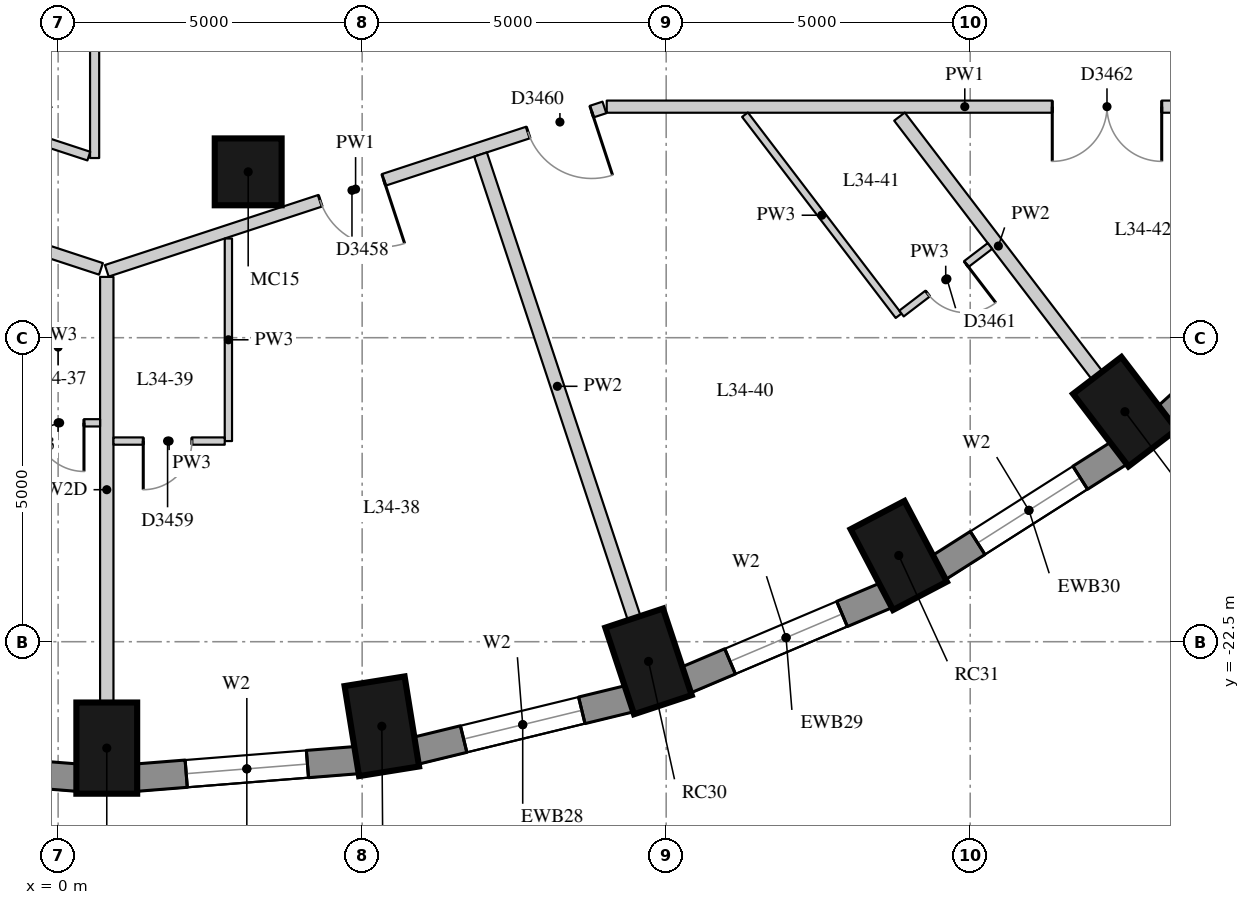
"""IFC4 building model, lengths in metres.
Left out: names, types, materials, properties, quantities, classifications, styles, units other than length and angle.
Written with IfcOpenShell. Run it as: python <this file> out.ifc"""

import sys

from ifc_helpers import new_model, si_unit, direction, frame, frame_2d, origin, origin_2d, place, context, subcontext, project, spatial, rectangle, extrude, element, fill, save


model = new_model("IFC4")
c1 = context("Model", 3, precision=1e-05, world=origin(), true_north=direction((0.0, 1.0)))
c2 = subcontext(c1, "Body", "Model", "MODEL_VIEW")
j1 = project(units=[si_unit("LENGTHUNIT", "METRE"), si_unit("PLANEANGLEUNIT", "RADIAN")], contexts=[c1])
p1 = place(None, origin())
s1 = spatial("IfcSite", under=j1, at=p1, CompositionType="ELEMENT")
p2 = place(p1, origin())
s2 = spatial("IfcBuilding", under=s1, at=p2, CompositionType="ELEMENT")
p3 = place(p2, frame((0.0, 0.0, 121.9)))
s3 = spatial("IfcBuildingStorey", under=s2, at=p3, CompositionType="ELEMENT", Elevation=121.9)
for number, where, z_axis, x_axis in (
    (1, (0.8, -24.25, 0.0), (0.0, 0.0, 1.0), (0.0, -1.0, 0.0)),
    (2, (5.323, -23.891, 0.0), (0.0, 0.0, 1.0), (0.159, -0.987, 0.0)),
    (3, (9.71, -22.824, 0.0), (0.0, 0.0, 1.0), (0.315, -0.949, 0.0)),
    (4, (13.825, -21.082, 0.0), (0.0, 0.0, 1.0), (0.465, -0.885, 0.0)),
    (5, (17.545, -18.717, 0.0), (0.0, 0.0, 1.0), (0.607, -0.795, 0.0)),
):
    element("IfcColumn", number, at=place(p3, frame(where, z_axis=z_axis, x_axis=x_axis)), inside=s3, PredefinedType="COLUMN", context=c2, shape_type="SweptSolid", body=[
        extrude(rectangle(XDim=1.5, YDim=1.0, at=origin_2d()), origin(), (0.0, 0.0, 1.0), 3.3),
    ])
p4 = place(p3, frame((3.126, -14.772, 0.0), z_axis=(0.0, 0.0, 1.0), x_axis=(1.0, 0.0, 0.0)))
e6 = element("IfcColumn", 6, at=p4, inside=s3, PredefinedType="COLUMN", context=c2, shape_type="SweptSolid", body=[
    extrude(rectangle(XDim=1.1, YDim=1.1, at=origin_2d()), origin(), (0.0, 0.0, 1.0), 3.3),
])
p5 = place(p3, frame((-3.327, -24.447, 0.0), z_axis=(0.0, 0.0, 1.0), x_axis=(0.996862216754, -0.079156306178, 0.0)))
e7 = element("IfcWall", 7, at=p5, inside=s3, PredefinedType="SOLIDWALL", context=c2, shape_type="SweptSolid", body=[
    extrude(rectangle(XDim=3.658, YDim=0.45, at=frame_2d((1.829, 0.0))), origin(), (0.0, 0.0, 1.0), 3.02),
])
p6 = place(p5, frame((0.829, 0.0, 0.4)))
e8 = element("IfcOpeningElement", 8, at=p6, cuts=e7, PredefinedType="OPENING", context=c2, shape_type="SweptSolid", body=[
    extrude(rectangle(XDim=2.0, YDim=1.75, at=frame_2d((1.0, 0.875))), frame((0.0, 0.235, 0.0), z_axis=(0.0, -1.0, 0.0), x_axis=(1.0, 0.0, 0.0)), (0.0, 0.0, 1.0), 0.47),
])
p7 = place(p3, frame((1.28, -24.736, 0.0), z_axis=(0.0, 0.0, 1.0), x_axis=(0.996862216754, 0.079156306178, 0.0)))
e9 = element("IfcWall", 9, at=p7, inside=s3, PredefinedType="SOLIDWALL", context=c2, shape_type="SweptSolid", body=[
    extrude(rectangle(XDim=3.658, YDim=0.45, at=frame_2d((1.829, 0.0))), origin(), (0.0, 0.0, 1.0), 3.02),
])
p8 = place(p7, frame((0.829, 0.0, 0.4)))
e10 = element("IfcOpeningElement", 10, at=p8, cuts=e9, PredefinedType="OPENING", context=c2, shape_type="SweptSolid", body=[
    extrude(rectangle(XDim=2.0, YDim=1.75, at=frame_2d((1.0, 0.875))), frame((0.0, 0.235, 0.0), z_axis=(0.0, -1.0, 0.0), x_axis=(1.0, 0.0, 0.0)), (0.0, 0.0, 1.0), 0.47),
])
p9 = place(p3, frame((5.875, -24.294, 0.0), z_axis=(0.0, 0.0, 1.0), x_axis=(0.971667603162, 0.236351579148, 0.0)))
e11 = element("IfcWall", 11, at=p9, inside=s3, PredefinedType="SOLIDWALL", context=c2, shape_type="SweptSolid", body=[
    extrude(rectangle(XDim=3.635, YDim=0.45, at=frame_2d((1.817, 0.0))), origin(), (0.0, 0.0, 1.0), 3.02),
])
p10 = place(p9, frame((0.817, 0.0, 0.4)))
e12 = element("IfcOpeningElement", 12, at=p10, cuts=e11, PredefinedType="OPENING", context=c2, shape_type="SweptSolid", body=[
    extrude(rectangle(XDim=2.0, YDim=1.75, at=frame_2d((1.0, 0.875))), frame((0.0, 0.235, 0.0), z_axis=(0.0, -1.0, 0.0), x_axis=(1.0, 0.0, 0.0)), (0.0, 0.0, 1.0), 0.47),
])
p11 = place(p3, frame((10.318, -23.134, 0.0), z_axis=(0.0, 0.0, 1.0), x_axis=(0.920869643542, 0.389870619055, 0.0)))
e13 = element("IfcWall", 13, at=p11, inside=s3, PredefinedType="SOLIDWALL", context=c2, shape_type="SweptSolid", body=[
    extrude(rectangle(XDim=3.591, YDim=0.45, at=frame_2d((1.796, 0.0))), origin(), (0.0, 0.0, 1.0), 3.02),
])
p12 = place(p11, frame((0.796, 0.0, 0.4)))
e14 = element("IfcOpeningElement", 14, at=p12, cuts=e13, PredefinedType="OPENING", context=c2, shape_type="SweptSolid", body=[
    extrude(rectangle(XDim=2.0, YDim=1.75, at=frame_2d((1.0, 0.875))), frame((0.0, 0.235, 0.0), z_axis=(0.0, -1.0, 0.0), x_axis=(1.0, 0.0, 0.0)), (0.0, 0.0, 1.0), 0.47),
])
p13 = place(p3, frame((14.475, -21.287, 0.0), z_axis=(0.0, 0.0, 1.0), x_axis=(0.843911841423, 0.536481876587, 0.0)))
e15 = element("IfcWall", 15, at=p13, inside=s3, PredefinedType="SOLIDWALL", context=c2, shape_type="SweptSolid", body=[
    extrude(rectangle(XDim=3.532, YDim=0.45, at=frame_2d((1.766, 0.0))), origin(), (0.0, 0.0, 1.0), 3.02),
])
p14 = place(p13, frame((0.766, 0.0, 0.4)))
e16 = element("IfcOpeningElement", 16, at=p14, cuts=e15, PredefinedType="OPENING", context=c2, shape_type="SweptSolid", body=[
    extrude(rectangle(XDim=2.0, YDim=1.75, at=frame_2d((1.0, 0.875))), frame((0.0, 0.235, 0.0), z_axis=(0.0, -1.0, 0.0), x_axis=(1.0, 0.0, 0.0)), (0.0, 0.0, 1.0), 0.47),
])
p15 = place(p3, frame((18.219, -18.81, 0.0), z_axis=(0.0, 0.0, 1.0), x_axis=(0.740364106106, 0.672206062446, 0.0)))
e17 = element("IfcWall", 17, at=p15, inside=s3, PredefinedType="SOLIDWALL", context=c2, shape_type="SweptSolid", body=[
    extrude(rectangle(XDim=3.464, YDim=0.45, at=frame_2d((1.732, 0.0))), origin(), (0.0, 0.0, 1.0), 3.02),
])
p16 = place(p3, frame((20.8, -13.7, 0.0), z_axis=(0.0, 0.0, 1.0), x_axis=(-1.0, 0.0, 0.0)))
e18 = element("IfcWall", 18, at=p16, inside=s3, PredefinedType="PARTITIONING", context=c2, shape_type="SweptSolid", body=[
    extrude(rectangle(XDim=11.778, YDim=0.2, at=frame_2d((5.889, 0.0))), origin(), (0.0, 0.0, 1.0), 3.02),
])
p17 = place(p16, frame((2.65, 0.0, 0.0)))
e19 = element("IfcOpeningElement", 19, at=p17, cuts=e18, PredefinedType="OPENING", context=c2, shape_type="SweptSolid", body=[
    extrude(rectangle(XDim=1.8, YDim=2.1, at=frame_2d((0.9, 1.05))), frame((0.0, 0.11, 0.0), z_axis=(0.0, -1.0, 0.0), x_axis=(1.0, 0.0, 0.0)), (0.0, 0.0, 1.0), 0.22),
])
p18 = place(p3, frame((8.984, -13.713, 0.0), z_axis=(0.0, 0.0, 1.0), x_axis=(-0.950093687873, -0.311964716378, 0.0)))
e20 = element("IfcWall", 20, at=p18, inside=s3, PredefinedType="PARTITIONING", context=c2, shape_type="SweptSolid", body=[
    extrude(rectangle(XDim=8.614, YDim=0.2, at=frame_2d((4.307, 0.0))), origin(), (0.0, 0.0, 1.0), 3.02),
])
p19 = place(p18, frame((3.82, 0.0, 0.0)))
e21 = element("IfcOpeningElement", 21, at=p19, cuts=e20, PredefinedType="OPENING", context=c2, shape_type="SweptSolid", body=[
    extrude(rectangle(XDim=1.1, YDim=2.1, at=frame_2d((0.55, 1.05))), frame((0.0, 0.11, 0.0), z_axis=(0.0, -1.0, 0.0), x_axis=(1.0, 0.0, 0.0)), (0.0, 0.0, 1.0), 0.22),
])
p20 = place(p18, frame((0.22, 0.0, 0.0)))
e22 = element("IfcOpeningElement", 22, at=p20, cuts=e20, PredefinedType="OPENING", context=c2, shape_type="SweptSolid", body=[
    extrude(rectangle(XDim=1.1, YDim=2.1, at=frame_2d((0.55, 1.05))), frame((0.0, 0.11, 0.0), z_axis=(0.0, -1.0, 0.0), x_axis=(1.0, 0.0, 0.0)), (0.0, 0.0, 1.0), 0.22),
])
p21 = place(p3, frame((0.705, -16.368, 0.0), z_axis=(0.0, 0.0, 1.0), x_axis=(-0.95010544032, 0.311928921832, 0.0)))
e23 = element("IfcWall", 23, at=p21, inside=s3, PredefinedType="PARTITIONING", context=c2, shape_type="SweptSolid", body=[
    extrude(rectangle(XDim=8.951, YDim=0.2, at=frame_2d((4.476, 0.0))), origin(), (0.0, 0.0, 1.0), 2.57),
])
p22 = place(p21, frame((6.993, 0.0, 0.0)))
e24 = element("IfcOpeningElement", 24, at=p22, cuts=e23, PredefinedType="OPENING", context=c2, shape_type="SweptSolid", body=[
    extrude(rectangle(XDim=1.1, YDim=2.1, at=frame_2d((0.55, 1.05))), frame((0.0, 0.11, 0.0), z_axis=(0.0, -1.0, 0.0), x_axis=(1.0, 0.0, 0.0)), (0.0, 0.0, 1.0), 0.22),
])
p23 = place(p21, frame((5.248, 0.0, 0.0)))
e25 = element("IfcOpeningElement", 25, at=p23, cuts=e23, PredefinedType="OPENING", context=c2, shape_type="SweptSolid", body=[
    extrude(rectangle(XDim=0.9, YDim=2.1, at=frame_2d((0.45, 1.05))), frame((0.0, 0.11, 0.0), z_axis=(0.0, -1.0, 0.0), x_axis=(1.0, 0.0, 0.0)), (0.0, 0.0, 1.0), 0.22),
])
p24 = place(p21, frame((1.688, 0.0, 0.0)))
e26 = element("IfcOpeningElement", 26, at=p24, cuts=e23, PredefinedType="OPENING", context=c2, shape_type="SweptSolid", body=[
    extrude(rectangle(XDim=1.0, YDim=2.1, at=frame_2d((0.5, 1.05))), frame((0.0, 0.11, 0.0), z_axis=(0.0, -1.0, 0.0), x_axis=(1.0, 0.0, 0.0)), (0.0, 0.0, 1.0), 0.22),
])
p25 = place(p3, frame((0.6, -9.23, 0.0), z_axis=(0.0, 0.0, 1.0), x_axis=(0.0, -1.0, 0.0)))
e27 = element("IfcWall", 27, at=p25, inside=s3, PredefinedType="PARTITIONING", context=c2, shape_type="SweptSolid", body=[
    extrude(rectangle(XDim=5.315, YDim=0.15, at=frame_2d((2.657, 0.0))), origin(), (0.0, 0.0, 1.0), 3.02),
])
p26 = place(p3, frame((0.505, -14.513, 0.0), z_axis=(0.0, 0.0, 1.0), x_axis=(-0.950175898888, 0.31171422998, 0.0)))
e28 = element("IfcWall", 28, at=p26, inside=s3, PredefinedType="PARTITIONING", context=c2, shape_type="SweptSolid", body=[
    extrude(rectangle(XDim=1.9, YDim=0.15, at=frame_2d((0.95, 0.0))), origin(), (0.0, 0.0, 1.0), 3.02),
])
p27 = place(p3, frame((0.8, -23.5, 0.0), z_axis=(0.0, 0.0, 1.0), x_axis=(0.0, 1.0, 0.0)))
e29 = element("IfcWall", 29, at=p27, inside=s3, PredefinedType="PARTITIONING", context=c2, shape_type="SweptSolid", body=[
    extrude(rectangle(XDim=7.0, YDim=0.22, at=frame_2d((3.5, 0.0))), origin(), (0.0, 0.0, 1.0), 2.47),
])
p28 = place(p3, frame((9.474, -22.112, 0.0), z_axis=(0.0, 0.0, 1.0), x_axis=(-0.314531362585, 0.949247081613, 0.0)))
e30 = element("IfcWall", 30, at=p28, inside=s3, PredefinedType="PARTITIONING", context=c2, shape_type="SweptSolid", body=[
    extrude(rectangle(XDim=8.033, YDim=0.22, at=frame_2d((4.017, 0.0))), origin(), (0.0, 0.0, 1.0), 3.02),
])
p29 = place(p3, frame((17.089, -18.121, 0.0), z_axis=(0.0, 0.0, 1.0), x_axis=(-0.607049146133, 0.794664290238, 0.0)))
e31 = element("IfcWall", 31, at=p29, inside=s3, PredefinedType="PARTITIONING", context=c2, shape_type="SweptSolid", body=[
    extrude(rectangle(XDim=5.357, YDim=0.22, at=frame_2d((2.679, 0.0))), origin(), (0.0, 0.0, 1.0), 3.02),
])
p30 = place(p3, frame((2.8, -15.868, 0.0), z_axis=(0.0, 0.0, 1.0), x_axis=(0.0, -1.0, 0.0)))
e32 = element("IfcWall", 32, at=p30, inside=s3, PredefinedType="PARTITIONING", context=c2, shape_type="SweptSolid", body=[
    extrude(rectangle(XDim=3.332, YDim=0.12, at=frame_2d((1.666, 0.0))), origin(), (0.0, 0.0, 1.0), 3.02),
])
p31 = place(p3, frame((11.296, -13.832, 0.0), z_axis=(0.0, 0.0, 1.0), x_axis=(0.607062475719, -0.794654107505, 0.0)))
e33 = element("IfcWall", 33, at=p31, inside=s3, PredefinedType="PARTITIONING", context=c2, shape_type="SweptSolid", body=[
    extrude(rectangle(XDim=4.162, YDim=0.12, at=frame_2d((2.081, 0.0))), origin(), (0.0, 0.0, 1.0), 3.02),
])
p32 = place(p3, frame((-0.69, -18.9, 0.0), z_axis=(0.0, 0.0, 1.0), x_axis=(1.0, 0.0, 0.0)))
e34 = element("IfcWall", 34, at=p32, inside=s3, PredefinedType="PARTITIONING", context=c2, shape_type="SweptSolid", body=[
    extrude(rectangle(XDim=1.38, YDim=0.12, at=frame_2d((0.69, 0.0))), origin(), (0.0, 0.0, 1.0), 3.02),
])
p33 = place(p32, frame((0.315, 0.0, 0.0)))
e35 = element("IfcOpeningElement", 35, at=p33, cuts=e34, PredefinedType="OPENING", context=c2, shape_type="SweptSolid", body=[
    extrude(rectangle(XDim=0.8, YDim=2.1, at=frame_2d((0.4, 1.05))), frame((0.0, 0.07, 0.0), z_axis=(0.0, -1.0, 0.0), x_axis=(1.0, 0.0, 0.0)), (0.0, 0.0, 1.0), 0.14),
])
p34 = place(p3, frame((2.74, -19.2, 0.0), z_axis=(0.0, 0.0, 1.0), x_axis=(-1.0, 0.0, 0.0)))
e36 = element("IfcWall", 36, at=p34, inside=s3, PredefinedType="PARTITIONING", context=c2, shape_type="SweptSolid", body=[
    extrude(rectangle(XDim=1.83, YDim=0.12, at=frame_2d((0.915, 0.0))), origin(), (0.0, 0.0, 1.0), 3.02),
])
p35 = place(p34, frame((0.54, 0.0, 0.0)))
e37 = element("IfcOpeningElement", 37, at=p35, cuts=e36, PredefinedType="OPENING", context=c2, shape_type="SweptSolid", body=[
    extrude(rectangle(XDim=0.8, YDim=2.1, at=frame_2d((0.4, 1.05))), frame((0.0, 0.07, 0.0), z_axis=(0.0, -1.0, 0.0), x_axis=(1.0, 0.0, 0.0)), (0.0, 0.0, 1.0), 0.14),
])
p36 = place(p3, frame((13.87, -17.103, 0.0), z_axis=(0.0, 0.0, 1.0), x_axis=(0.794637937609, 0.607083641776, 0.0)))
e38 = element("IfcWall", 38, at=p36, inside=s3, PredefinedType="PARTITIONING", context=c2, shape_type="SweptSolid", body=[
    extrude(rectangle(XDim=1.83, YDim=0.12, at=frame_2d((0.915, 0.0))), origin(), (0.0, 0.0, 1.0), 3.02),
])
p37 = place(p36, frame((0.54, 0.0, 0.0)))
e39 = element("IfcOpeningElement", 39, at=p37, cuts=e38, PredefinedType="OPENING", context=c2, shape_type="SweptSolid", body=[
    extrude(rectangle(XDim=0.8, YDim=2.1, at=frame_2d((0.4, 1.05))), frame((0.0, 0.07, 0.0), z_axis=(0.0, -1.0, 0.0), x_axis=(1.0, 0.0, 0.0)), (0.0, 0.0, 1.0), 0.14),
])
p38 = place(p8, origin())
e40 = element("IfcWindow", 40, at=p38, inside=s3, PartitioningType="SINGLE_PANEL", PredefinedType="WINDOW", context=c2, shape_type="SweptSolid", body=[
    extrude(rectangle(XDim=2.0, YDim=1.75, at=frame_2d((1.0, 0.875))), frame((0.0, 0.035, 0.0), z_axis=(0.0, -1.0, 0.0), x_axis=(1.0, 0.0, 0.0)), (0.0, 0.0, 1.0), 0.06),
])
fill(e10, e40)
p39 = place(p10, origin())
e41 = element("IfcWindow", 41, at=p39, inside=s3, PartitioningType="SINGLE_PANEL", PredefinedType="WINDOW", context=c2, shape_type="SweptSolid", body=[
    extrude(rectangle(XDim=2.0, YDim=1.75, at=frame_2d((1.0, 0.875))), frame((0.0, 0.035, 0.0), z_axis=(0.0, -1.0, 0.0), x_axis=(1.0, 0.0, 0.0)), (0.0, 0.0, 1.0), 0.06),
])
fill(e12, e41)
p40 = place(p12, origin())
e42 = element("IfcWindow", 42, at=p40, inside=s3, PartitioningType="SINGLE_PANEL", PredefinedType="WINDOW", context=c2, shape_type="SweptSolid", body=[
    extrude(rectangle(XDim=2.0, YDim=1.75, at=frame_2d((1.0, 0.875))), frame((0.0, 0.035, 0.0), z_axis=(0.0, -1.0, 0.0), x_axis=(1.0, 0.0, 0.0)), (0.0, 0.0, 1.0), 0.06),
])
fill(e14, e42)
p41 = place(p14, origin())
e43 = element("IfcWindow", 43, at=p41, inside=s3, PartitioningType="SINGLE_PANEL", PredefinedType="WINDOW", context=c2, shape_type="SweptSolid", body=[
    extrude(rectangle(XDim=2.0, YDim=1.75, at=frame_2d((1.0, 0.875))), frame((0.0, 0.035, 0.0), z_axis=(0.0, -1.0, 0.0), x_axis=(1.0, 0.0, 0.0)), (0.0, 0.0, 1.0), 0.06),
])
fill(e16, e43)
p42 = place(p33, origin())
e44 = element("IfcDoor", 44, at=p42, inside=s3, OperationType="SINGLE_SWING_LEFT", PredefinedType="DOOR", context=c2, shape_type="SweptSolid", body=[
    extrude(rectangle(XDim=0.8, YDim=2.1, at=frame_2d((0.4, 1.05))), frame((0.0, 0.025, 0.0), z_axis=(0.0, -1.0, 0.0), x_axis=(1.0, 0.0, 0.0)), (0.0, 0.0, 1.0), 0.05),
])
fill(e35, e44)
p43 = place(p19, origin())
e45 = element("IfcDoor", 45, at=p43, inside=s3, OperationType="SINGLE_SWING_LEFT", PredefinedType="DOOR", context=c2, shape_type="SweptSolid", body=[
    extrude(rectangle(XDim=1.1, YDim=2.1, at=frame_2d((0.55, 1.05))), frame((0.0, 0.025, 0.0), z_axis=(0.0, -1.0, 0.0), x_axis=(1.0, 0.0, 0.0)), (0.0, 0.0, 1.0), 0.05),
])
fill(e21, e45)
p44 = place(p35, origin())
e46 = element("IfcDoor", 46, at=p44, inside=s3, OperationType="SINGLE_SWING_RIGHT", PredefinedType="DOOR", context=c2, shape_type="SweptSolid", body=[
    extrude(rectangle(XDim=0.8, YDim=2.1, at=frame_2d((0.4, 1.05))), frame((0.0, 0.025, 0.0), z_axis=(0.0, -1.0, 0.0), x_axis=(1.0, 0.0, 0.0)), (0.0, 0.0, 1.0), 0.05),
])
fill(e37, e46)
p45 = place(p20, origin())
e47 = element("IfcDoor", 47, at=p45, inside=s3, OperationType="SINGLE_SWING_LEFT", PredefinedType="DOOR", context=c2, shape_type="SweptSolid", body=[
    extrude(rectangle(XDim=1.1, YDim=2.1, at=frame_2d((0.55, 1.05))), frame((0.0, 0.025, 0.0), z_axis=(0.0, -1.0, 0.0), x_axis=(1.0, 0.0, 0.0)), (0.0, 0.0, 1.0), 0.05),
])
fill(e22, e47)
p46 = place(p37, origin())
e48 = element("IfcDoor", 48, at=p46, inside=s3, OperationType="SINGLE_SWING_LEFT", PredefinedType="DOOR", context=c2, shape_type="SweptSolid", body=[
    extrude(rectangle(XDim=0.8, YDim=2.1, at=frame_2d((0.4, 1.05))), frame((0.0, 0.025, 0.0), z_axis=(0.0, -1.0, 0.0), x_axis=(1.0, 0.0, 0.0)), (0.0, 0.0, 1.0), 0.05),
])
fill(e39, e48)
p47 = place(p17, origin())
e49 = element("IfcDoor", 49, at=p47, inside=s3, OperationType="DOUBLE_DOOR_SINGLE_SWING", PredefinedType="DOOR", context=c2, shape_type="SweptSolid", body=[
    extrude(rectangle(XDim=1.8, YDim=2.1, at=frame_2d((0.9, 1.05))), frame((0.0, 0.025, 0.0), z_axis=(0.0, -1.0, 0.0), x_axis=(1.0, 0.0, 0.0)), (0.0, 0.0, 1.0), 0.05),
])
fill(e19, e49)
save(model, sys.argv[1])
